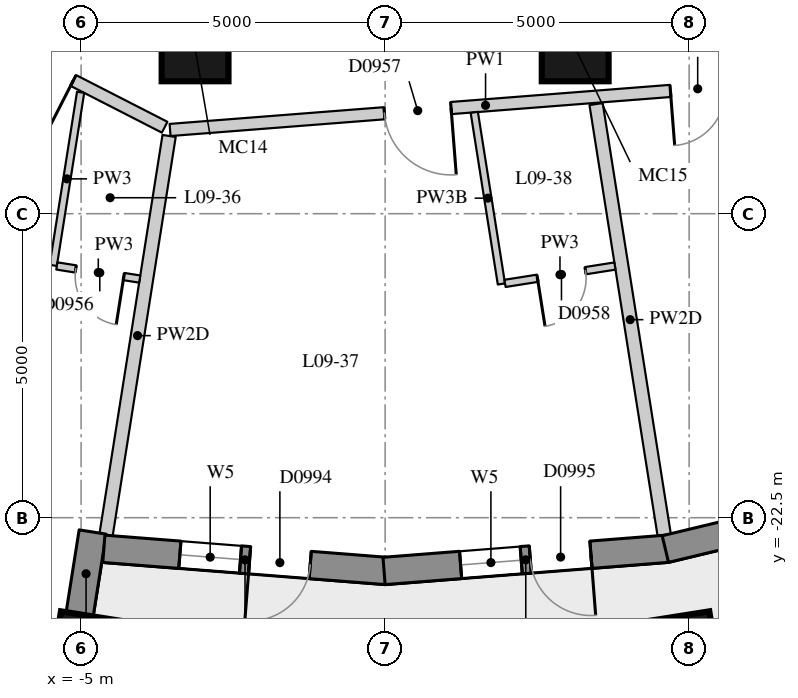
"""IFC4 building model, lengths in metres.
Left out: names, types, materials, properties, quantities, classifications, styles, units other than length and angle.
Written with IfcOpenShell. Run it as: python <this file> out.ifc"""

import sys

from ifc_helpers import new_model, si_unit, direction, frame, frame_2d, origin, origin_2d, place, context, subcontext, project, spatial, rectangle, extrude, element, fill, save


model = new_model("IFC4")
c1 = context("Model", 3, precision=1e-05, world=origin(), true_north=direction((0.0, 1.0)))
c2 = subcontext(c1, "Body", "Model", "MODEL_VIEW")
j1 = project(units=[si_unit("LENGTHUNIT", "METRE"), si_unit("PLANEANGLEUNIT", "RADIAN")], contexts=[c1])
p1 = place(None, origin())
s1 = spatial("IfcSite", under=j1, at=p1, CompositionType="ELEMENT")
p2 = place(p1, origin())
s2 = spatial("IfcBuilding", under=s1, at=p2, CompositionType="ELEMENT")
p3 = place(p2, frame((0.0, 0.0, 38.2)))
s3 = spatial("IfcBuildingStorey", under=s2, at=p3, CompositionType="ELEMENT", Elevation=38.2)
for number, where, z_axis, x_axis in (
    (1, (-4.906, -24.866, 0.0), (0.0, 0.0, 1.0), (-0.156, -0.988, 0.0)),
    (2, (4.906, -24.866, 0.0), (0.0, 0.0, 1.0), (0.156, -0.988, 0.0)),
):
    element("IfcColumn", number, at=place(p3, frame(where, z_axis=z_axis, x_axis=x_axis)), inside=s3, PredefinedType="COLUMN", context=c2, shape_type="SweptSolid", body=[
        extrude(rectangle(XDim=1.5, YDim=1.1, at=origin_2d()), origin(), (0.0, 0.0, 1.0), 3.3),
    ])
for number, where, z_axis, x_axis in (
    (3, (-3.126, -14.772, 0.0), (0.0, 0.0, 1.0), (1.0, 0.0, 0.0)),
    (4, (3.126, -14.772, 0.0), (0.0, 0.0, 1.0), (1.0, 0.0, 0.0)),
):
    element("IfcColumn", number, at=place(p3, frame(where, z_axis=z_axis, x_axis=x_axis)), inside=s3, PredefinedType="COLUMN", context=c2, shape_type="SweptSolid", body=[
        extrude(rectangle(XDim=1.1, YDim=1.1, at=origin_2d()), origin(), (0.0, 0.0, 1.0), 3.3),
    ])
p4 = place(p3, frame((-9.308, -24.35, 0.0), z_axis=(0.0, 0.0, 1.0), x_axis=(0.972496561493, -0.232917233979, 0.0)))
e5 = element("IfcWall", 5, at=p4, inside=s3, PredefinedType="SOLIDWALL", context=c2, shape_type="SweptSolid", body=[
    extrude(rectangle(XDim=3.911, YDim=0.45, at=frame_2d((1.956, 0.0))), origin(), (0.0, 0.0, 1.0), 3.02),
])
p5 = place(p4, frame((0.855, 0.0, 0.4)))
e6 = element("IfcOpeningElement", 6, at=p5, cuts=e5, PredefinedType="OPENING", context=c2, shape_type="SweptSolid", body=[
    extrude(rectangle(XDim=2.2, YDim=1.75, at=frame_2d((1.1, 0.875))), frame((0.0, 0.235, 0.0), z_axis=(0.0, -1.0, 0.0), x_axis=(1.0, 0.0, 0.0)), (0.0, 0.0, 1.0), 0.47),
])
p6 = place(p3, frame((-5.027, -24.108, 0.0), z_axis=(0.0, 0.0, 1.0), x_axis=(0.156133927791, 0.98773589415, 0.0)))
e7 = element("IfcWall", 7, at=p6, inside=s3, PredefinedType="SOLIDWALL", context=c2, shape_type="SweptSolid", body=[
    extrude(rectangle(XDim=1.39, YDim=0.45, at=frame_2d((0.695, 0.0))), origin(), (0.0, 0.0, 1.0), 2.47),
])
p7 = place(p3, frame((-4.626, -23.011, 0.0), z_axis=(0.0, 0.0, 1.0), x_axis=(0.996937095772, -0.078207589615, 0.0)))
e8 = element("IfcWall", 8, at=p7, inside=s3, PredefinedType="SOLIDWALL", context=c2, shape_type="SweptSolid", body=[
    extrude(rectangle(XDim=4.657, YDim=0.45, at=frame_2d((2.329, 0.0))), origin(), (0.0, 0.0, 1.0), 3.02),
])
p8 = place(p7, frame((1.254, 0.0, 0.4)))
e9 = element("IfcOpeningElement", 9, at=p8, cuts=e8, PredefinedType="OPENING", context=c2, shape_type="SweptSolid", body=[
    extrude(rectangle(XDim=1.0, YDim=1.75, at=frame_2d((0.5, 0.875))), frame((0.0, 0.235, 0.0), z_axis=(0.0, -1.0, 0.0), x_axis=(1.0, 0.0, 0.0)), (0.0, 0.0, 1.0), 0.47),
])
p9 = place(p7, frame((2.404, 0.0, 0.0)))
e10 = element("IfcOpeningElement", 10, at=p9, cuts=e8, PredefinedType="OPENING", context=c2, shape_type="SweptSolid", body=[
    extrude(rectangle(XDim=1.0, YDim=2.15, at=frame_2d((0.5, 1.075))), frame((0.0, 0.235, 0.0), z_axis=(0.0, -1.0, 0.0), x_axis=(1.0, 0.0, 0.0)), (0.0, 0.0, 1.0), 0.47),
])
p10 = place(p3, frame((-0.018, -23.376, 0.0), z_axis=(0.0, 0.0, 1.0), x_axis=(0.996935982964, 0.078221773648, 0.0)))
e11 = element("IfcWall", 11, at=p10, inside=s3, PredefinedType="SOLIDWALL", context=c2, shape_type="SweptSolid", body=[
    extrude(rectangle(XDim=4.676, YDim=0.45, at=frame_2d((2.338, 0.0))), origin(), (0.0, 0.0, 1.0), 3.02),
])
p11 = place(p10, frame((1.263, 0.0, 0.4)))
e12 = element("IfcOpeningElement", 12, at=p11, cuts=e11, PredefinedType="OPENING", context=c2, shape_type="SweptSolid", body=[
    extrude(rectangle(XDim=1.0, YDim=1.75, at=frame_2d((0.5, 0.875))), frame((0.0, 0.235, 0.0), z_axis=(0.0, -1.0, 0.0), x_axis=(1.0, 0.0, 0.0)), (0.0, 0.0, 1.0), 0.47),
])
p12 = place(p10, frame((2.413, 0.0, 0.0)))
e13 = element("IfcOpeningElement", 13, at=p12, cuts=e11, PredefinedType="OPENING", context=c2, shape_type="SweptSolid", body=[
    extrude(rectangle(XDim=1.0, YDim=2.15, at=frame_2d((0.5, 1.075))), frame((0.0, 0.235, 0.0), z_axis=(0.0, -1.0, 0.0), x_axis=(1.0, 0.0, 0.0)), (0.0, 0.0, 1.0), 0.47),
])
p13 = place(p3, frame((4.608, -23.016, 0.0), z_axis=(0.0, 0.0, 1.0), x_axis=(0.972343667289, 0.233554688847, 0.0)))
e14 = element("IfcWall", 14, at=p13, inside=s3, PredefinedType="SOLIDWALL", context=c2, shape_type="SweptSolid", body=[
    extrude(rectangle(XDim=4.624, YDim=0.45, at=frame_2d((2.312, 0.0))), origin(), (0.0, 0.0, 1.0), 3.02),
])
p14 = place(p13, frame((1.237, 0.0, 0.4)))
e15 = element("IfcOpeningElement", 15, at=p14, cuts=e14, PredefinedType="OPENING", context=c2, shape_type="SweptSolid", body=[
    extrude(rectangle(XDim=1.0, YDim=1.75, at=frame_2d((0.5, 0.875))), frame((0.0, 0.235, 0.0), z_axis=(0.0, -1.0, 0.0), x_axis=(1.0, 0.0, 0.0)), (0.0, 0.0, 1.0), 0.47),
])
p15 = place(p13, frame((2.387, 0.0, 0.0)))
e16 = element("IfcOpeningElement", 16, at=p15, cuts=e14, PredefinedType="OPENING", context=c2, shape_type="SweptSolid", body=[
    extrude(rectangle(XDim=1.0, YDim=2.15, at=frame_2d((0.5, 1.075))), frame((0.0, 0.235, 0.0), z_axis=(0.0, -1.0, 0.0), x_axis=(1.0, 0.0, 0.0)), (0.0, 0.0, 1.0), 0.47),
])
p16 = place(p3, frame((6.84, -15.313, 0.0), z_axis=(0.0, 0.0, 1.0), x_axis=(-0.996968882229, -0.077801335898, 0.0)))
e17 = element("IfcWall", 17, at=p16, inside=s3, PredefinedType="PARTITIONING", context=c2, shape_type="SweptSolid", body=[
    extrude(rectangle(XDim=10.409, YDim=0.2, at=frame_2d((5.204, 0.0))), origin(), (0.0, 0.0, 1.0), 3.02),
])
p17 = place(p16, frame((5.773, 0.0, 0.0)))
e18 = element("IfcOpeningElement", 18, at=p17, cuts=e17, PredefinedType="OPENING", context=c2, shape_type="SweptSolid", body=[
    extrude(rectangle(XDim=1.1, YDim=2.1, at=frame_2d((0.55, 1.05))), frame((0.0, 0.11, 0.0), z_axis=(0.0, -1.0, 0.0), x_axis=(1.0, 0.0, 0.0)), (0.0, 0.0, 1.0), 0.22),
])
p18 = place(p16, frame((1.255, 0.0, 0.0)))
e19 = element("IfcOpeningElement", 19, at=p18, cuts=e17, PredefinedType="OPENING", context=c2, shape_type="SweptSolid", body=[
    extrude(rectangle(XDim=0.9, YDim=2.1, at=frame_2d((0.45, 1.05))), frame((0.0, 0.11, 0.0), z_axis=(0.0, -1.0, 0.0), x_axis=(1.0, 0.0, 0.0)), (0.0, 0.0, 1.0), 0.22),
])
p19 = place(p3, frame((-3.626, -16.078, 0.0), z_axis=(0.0, 0.0, 1.0), x_axis=(-0.890197807844, 0.455574212297, 0.0)))
e20 = element("IfcWall", 20, at=p19, inside=s3, PredefinedType="PARTITIONING", context=c2, shape_type="SweptSolid", body=[
    extrude(rectangle(XDim=4.801, YDim=0.2, at=frame_2d((2.4, 0.0))), origin(), (0.0, 0.0, 1.0), 2.57),
])
p20 = place(p19, frame((1.688, 0.0, 0.0)))
e21 = element("IfcOpeningElement", 21, at=p20, cuts=e20, PredefinedType="OPENING", context=c2, shape_type="SweptSolid", body=[
    extrude(rectangle(XDim=1.0, YDim=2.1, at=frame_2d((0.5, 1.05))), frame((0.0, 0.11, 0.0), z_axis=(0.0, -1.0, 0.0), x_axis=(1.0, 0.0, 0.0)), (0.0, 0.0, 1.0), 0.22),
])
p21 = place(p3, frame((-4.591, -22.789, 0.0), z_axis=(0.0, 0.0, 1.0), x_axis=(0.156104000092, 0.987740624433, 0.0)))
e22 = element("IfcWall", 22, at=p21, inside=s3, PredefinedType="PARTITIONING", context=c2, shape_type="SweptSolid", body=[
    extrude(rectangle(XDim=6.648, YDim=0.22, at=frame_2d((3.324, 0.0))), origin(), (0.0, 0.0, 1.0), 2.47),
])
p22 = place(p3, frame((4.591, -22.789, 0.0), z_axis=(0.0, 0.0, 1.0), x_axis=(-0.156144168019, 0.987734275397, 0.0)))
e23 = element("IfcWall", 23, at=p22, inside=s3, PredefinedType="PARTITIONING", context=c2, shape_type="SweptSolid", body=[
    extrude(rectangle(XDim=7.18, YDim=0.22, at=frame_2d((3.59, 0.0))), origin(), (0.0, 0.0, 1.0), 2.47),
])
p23 = place(p3, frame((-5.008, -15.504, 0.0), z_axis=(0.0, 0.0, 1.0), x_axis=(-0.156219239615, -0.987722404917, 0.0)))
e24 = element("IfcWall", 24, at=p23, inside=s3, PredefinedType="PARTITIONING", context=c2, shape_type="SweptSolid", body=[
    extrude(rectangle(XDim=2.882, YDim=0.12, at=frame_2d((1.441, 0.0))), origin(), (0.0, 0.0, 1.0), 3.02),
])
p24 = place(p3, frame((1.466, -15.833, 0.0), z_axis=(0.0, 0.0, 1.0), x_axis=(0.156164367571, -0.987731081976, 0.0)))
e25 = element("IfcWall", 25, at=p24, inside=s3, PredefinedType="PARTITIONING", context=c2, shape_type="SweptSolid", body=[
    extrude(rectangle(XDim=2.858, YDim=0.12, at=frame_2d((1.429, 0.0))), origin(), (0.0, 0.0, 1.0), 2.47),
])
p25 = place(p3, frame((-5.399, -18.359, 0.0), z_axis=(0.0, 0.0, 1.0), x_axis=(0.987722767831, -0.156216945011, 0.0)))
e26 = element("IfcWall", 26, at=p25, inside=s3, PredefinedType="PARTITIONING", context=c2, shape_type="SweptSolid", body=[
    extrude(rectangle(XDim=1.38, YDim=0.12, at=frame_2d((0.69, 0.0))), origin(), (0.0, 0.0, 1.0), 3.02),
])
p26 = place(p25, frame((0.315, 0.0, 0.0)))
e27 = element("IfcOpeningElement", 27, at=p26, cuts=e26, PredefinedType="OPENING", context=c2, shape_type="SweptSolid", body=[
    extrude(rectangle(XDim=0.8, YDim=2.1, at=frame_2d((0.4, 1.05))), frame((0.0, 0.07, 0.0), z_axis=(0.0, -1.0, 0.0), x_axis=(1.0, 0.0, 0.0)), (0.0, 0.0, 1.0), 0.14),
])
p27 = place(p3, frame((1.972, -18.646, 0.0), z_axis=(0.0, 0.0, 1.0), x_axis=(0.98774348746, 0.156085883351, 0.0)))
e28 = element("IfcWall", 28, at=p27, inside=s3, PredefinedType="PARTITIONING", context=c2, shape_type="SweptSolid", body=[
    extrude(rectangle(XDim=1.83, YDim=0.12, at=frame_2d((0.915, 0.0))), origin(), (0.0, 0.0, 1.0), 3.02),
])
p28 = place(p27, frame((0.54, 0.0, 0.0)))
e29 = element("IfcOpeningElement", 29, at=p28, cuts=e28, PredefinedType="OPENING", context=c2, shape_type="SweptSolid", body=[
    extrude(rectangle(XDim=0.8, YDim=2.1, at=frame_2d((0.4, 1.05))), frame((0.0, 0.07, 0.0), z_axis=(0.0, -1.0, 0.0), x_axis=(1.0, 0.0, 0.0)), (0.0, 0.0, 1.0), 0.14),
])
p29 = place(p8, origin())
e30 = element("IfcWindow", 30, at=p29, inside=s3, PartitioningType="SINGLE_PANEL", PredefinedType="WINDOW", context=c2, shape_type="SweptSolid", body=[
    extrude(rectangle(XDim=1.0, YDim=1.75, at=frame_2d((0.5, 0.875))), frame((0.0, 0.035, 0.0), z_axis=(0.0, -1.0, 0.0), x_axis=(1.0, 0.0, 0.0)), (0.0, 0.0, 1.0), 0.06),
])
fill(e9, e30)
p30 = place(p9, frame((1.0, 0.0, 0.0), z_axis=(0.0, 0.0, 1.0), x_axis=(-1.0, 0.0, 0.0)))
e31 = element("IfcDoor", 31, at=p30, inside=s3, OperationType="SINGLE_SWING_RIGHT", PredefinedType="DOOR", context=c2, shape_type="SweptSolid", body=[
    extrude(rectangle(XDim=1.0, YDim=2.15, at=frame_2d((0.5, 1.075))), frame((0.0, 0.075, 0.0), z_axis=(0.0, -1.0, 0.0), x_axis=(1.0, 0.0, 0.0)), (0.0, 0.0, 1.0), 0.05),
])
fill(e10, e31)
p31 = place(p11, origin())
e32 = element("IfcWindow", 32, at=p31, inside=s3, PartitioningType="SINGLE_PANEL", PredefinedType="WINDOW", context=c2, shape_type="SweptSolid", body=[
    extrude(rectangle(XDim=1.0, YDim=1.75, at=frame_2d((0.5, 0.875))), frame((0.0, 0.035, 0.0), z_axis=(0.0, -1.0, 0.0), x_axis=(1.0, 0.0, 0.0)), (0.0, 0.0, 1.0), 0.06),
])
fill(e12, e32)
p32 = place(p12, frame((1.0, 0.0, 0.0), z_axis=(0.0, 0.0, 1.0), x_axis=(-1.0, 0.0, 0.0)))
e33 = element("IfcDoor", 33, at=p32, inside=s3, OperationType="SINGLE_SWING_LEFT", PredefinedType="DOOR", context=c2, shape_type="SweptSolid", body=[
    extrude(rectangle(XDim=1.0, YDim=2.15, at=frame_2d((0.5, 1.075))), frame((0.0, 0.075, 0.0), z_axis=(0.0, -1.0, 0.0), x_axis=(1.0, 0.0, 0.0)), (0.0, 0.0, 1.0), 0.05),
])
fill(e13, e33)
p33 = place(p20, origin())
e34 = element("IfcDoor", 34, at=p33, inside=s3, OperationType="SINGLE_SWING_LEFT", PredefinedType="DOOR", context=c2, shape_type="SweptSolid", body=[
    extrude(rectangle(XDim=1.0, YDim=2.1, at=frame_2d((0.5, 1.05))), frame((0.0, 0.025, 0.0), z_axis=(0.0, -1.0, 0.0), x_axis=(1.0, 0.0, 0.0)), (0.0, 0.0, 1.0), 0.05),
])
fill(e21, e34)
p34 = place(p26, origin())
e35 = element("IfcDoor", 35, at=p34, inside=s3, OperationType="SINGLE_SWING_LEFT", PredefinedType="DOOR", context=c2, shape_type="SweptSolid", body=[
    extrude(rectangle(XDim=0.8, YDim=2.1, at=frame_2d((0.4, 1.05))), frame((0.0, 0.025, 0.0), z_axis=(0.0, -1.0, 0.0), x_axis=(1.0, 0.0, 0.0)), (0.0, 0.0, 1.0), 0.05),
])
fill(e27, e35)
p35 = place(p17, origin())
e36 = element("IfcDoor", 36, at=p35, inside=s3, OperationType="SINGLE_SWING_LEFT", PredefinedType="DOOR", context=c2, shape_type="SweptSolid", body=[
    extrude(rectangle(XDim=1.1, YDim=2.1, at=frame_2d((0.55, 1.05))), frame((0.0, 0.025, 0.0), z_axis=(0.0, -1.0, 0.0), x_axis=(1.0, 0.0, 0.0)), (0.0, 0.0, 1.0), 0.05),
])
fill(e18, e36)
p36 = place(p28, origin())
e37 = element("IfcDoor", 37, at=p36, inside=s3, OperationType="SINGLE_SWING_RIGHT", PredefinedType="DOOR", context=c2, shape_type="SweptSolid", body=[
    extrude(rectangle(XDim=0.8, YDim=2.1, at=frame_2d((0.4, 1.05))), frame((0.0, 0.025, 0.0), z_axis=(0.0, -1.0, 0.0), x_axis=(1.0, 0.0, 0.0)), (0.0, 0.0, 1.0), 0.05),
])
fill(e29, e37)
p37 = place(p18, origin())
e38 = element("IfcDoor", 38, at=p37, inside=s3, OperationType="SINGLE_SWING_RIGHT", PredefinedType="DOOR", context=c2, shape_type="SweptSolid", body=[
    extrude(rectangle(XDim=0.9, YDim=2.1, at=frame_2d((0.45, 1.05))), frame((0.0, 0.025, 0.0), z_axis=(0.0, -1.0, 0.0), x_axis=(1.0, 0.0, 0.0)), (0.0, 0.0, 1.0), 0.05),
])
fill(e19, e38)
save(model, sys.argv[1])
